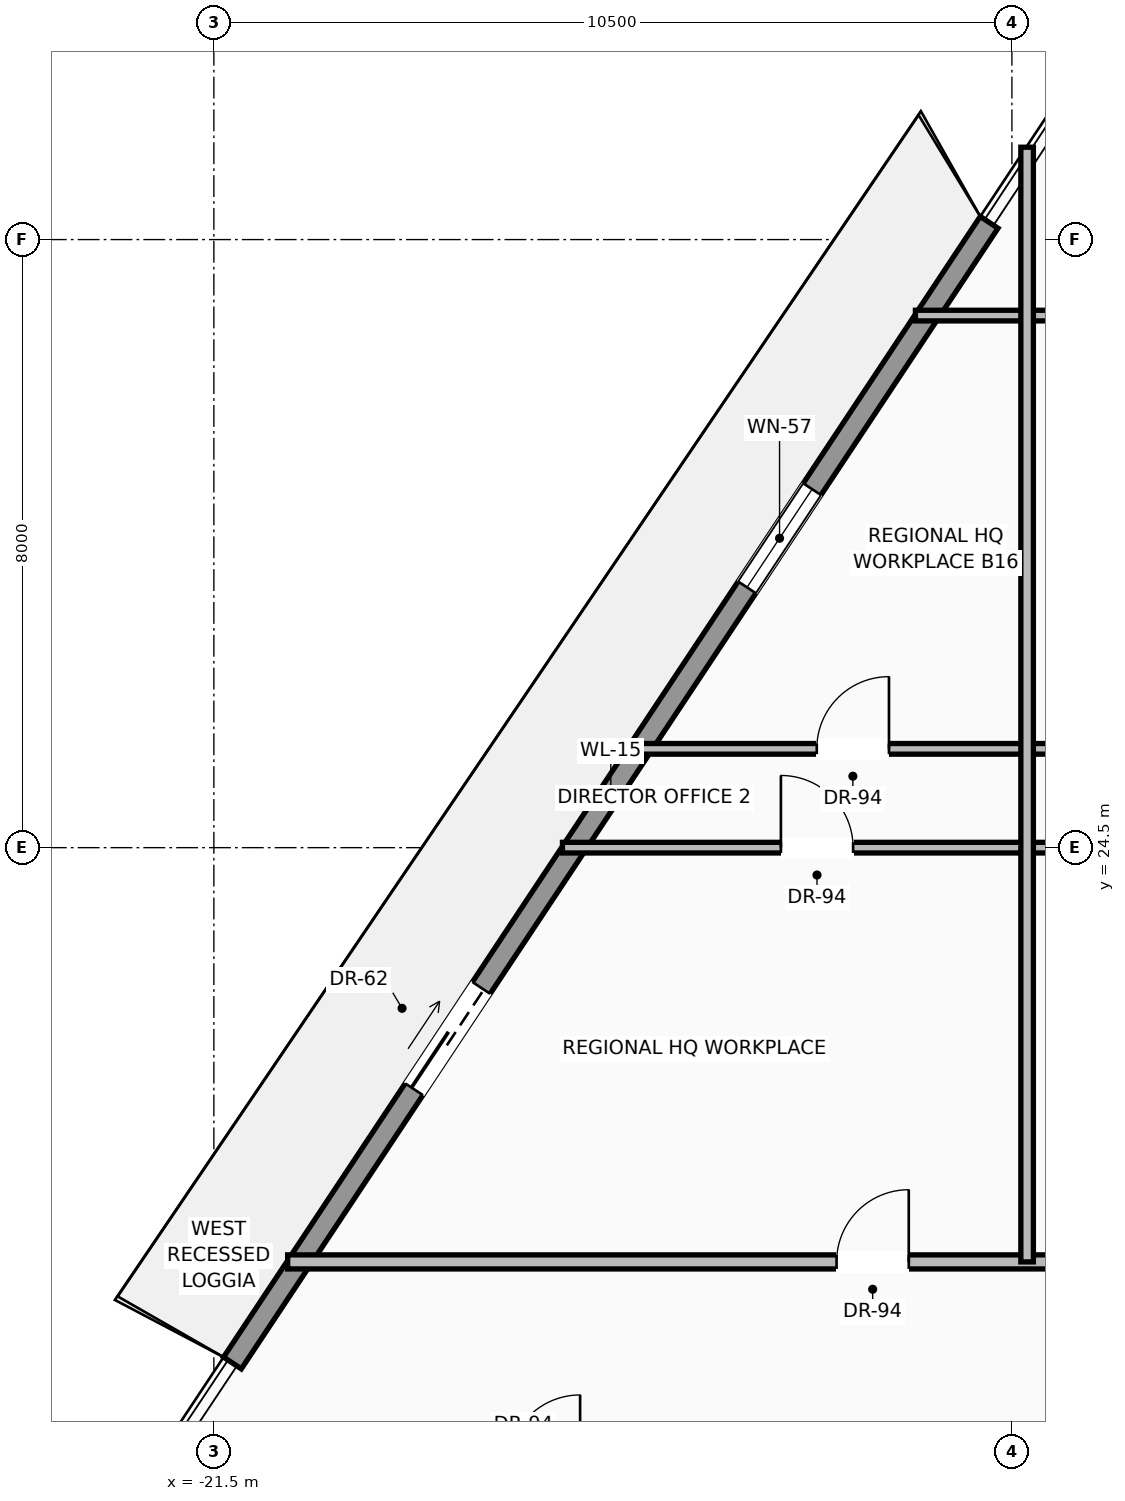
"""IFC4 building model, lengths in metres.
Left out: names, types, materials, properties, quantities, classifications, styles, units other than length and angle.
Written with IfcOpenShell. Run it as: python <this file> out.ifc"""

import sys

from ifc_helpers import new_model, si_unit, direction, frame, frame_2d, origin, place, context, subcontext, project, spatial, rectangle, extrude, source, transform, mapped, element, fill, save


model = new_model("IFC4")
c1 = context("Model", 3, precision=1e-05, world=origin(), true_north=direction((0.0, 1.0)))
c2 = subcontext(c1, "Body", "Model", "MODEL_VIEW")
j1 = project(units=[si_unit("LENGTHUNIT", "METRE"), si_unit("PLANEANGLEUNIT", "RADIAN")], contexts=[c1])
p1 = place(None, origin())
s1 = spatial("IfcSite", under=j1, at=p1, CompositionType="ELEMENT")
p2 = place(p1, origin())
s2 = spatial("IfcBuilding", under=s1, at=p2, CompositionType="ELEMENT")
p3 = place(p2, frame((0.0, 0.0, 117.3)))
s3 = spatial("IfcBuildingStorey", under=s2, at=p3, CompositionType="ELEMENT", Elevation=117.3)
p4 = place(p3, frame((-21.256, 17.72, 0.0), z_axis=(0.0, 0.0, 1.0), x_axis=(0.552837339674, 0.833289191015, 0.0)))
e1 = element("IfcWall", 1, at=p4, inside=s3, PredefinedType="SOLIDWALL", context=c2, shape_type="SweptSolid", body=[
    extrude(rectangle(XDim=18.009, YDim=0.28, at=frame_2d((9.004, 0.0))), origin(), (0.0, 0.0, 1.0), 3.0),
])
p5 = place(p4, frame((4.322, 0.0, 0.0)))
e2 = element("IfcOpeningElement", 2, at=p5, cuts=e1, PredefinedType="OPENING", context=c2, shape_type="SweptSolid", body=[
    extrude(rectangle(XDim=1.6, YDim=2.35, at=frame_2d((0.8, 1.175))), frame((0.0, 0.15, 0.0), z_axis=(0.0, -1.0, 0.0), x_axis=(1.0, 0.0, 0.0)), (0.0, 0.0, 1.0), 0.3),
])
p6 = place(p4, frame((12.246, 0.0, 0.9)))
e3 = element("IfcOpeningElement", 3, at=p6, cuts=e1, PredefinedType="OPENING", context=c2, shape_type="SweptSolid", body=[
    extrude(rectangle(XDim=1.55, YDim=1.85, at=frame_2d((0.775, 0.925))), frame((0.0, 0.15, 0.0), z_axis=(0.0, -1.0, 0.0), x_axis=(1.0, 0.0, 0.0)), (0.0, 0.0, 1.0), 0.3),
])
p7 = place(p3, frame((-20.529, 19.05, 0.0), z_axis=(0.0, 0.0, 1.0), x_axis=(1.0, 0.0, 0.0)))
e4 = element("IfcWall", 4, at=p7, inside=s3, PredefinedType="PARTITIONING", context=c2, shape_type="SweptSolid", body=[
    extrude(rectangle(XDim=17.029, YDim=0.185, at=frame_2d((8.515, 0.0))), origin(), (0.0, 0.0, 1.0), 2.717),
])
p8 = place(p7, frame((7.222, 0.0, 0.0)))
e5 = element("IfcOpeningElement", 5, at=p8, cuts=e4, PredefinedType="OPENING", context=c2, shape_type="SweptSolid", body=[
    extrude(rectangle(XDim=0.95, YDim=2.2, at=frame_2d((0.475, 1.1))), frame((0.0, 0.103, 0.0), z_axis=(0.0, -1.0, 0.0), x_axis=(1.0, 0.0, 0.0)), (0.0, 0.0, 1.0), 0.205),
])
p9 = place(p3, frame((-16.914, 24.5, 0.0), z_axis=(0.0, 0.0, 1.0), x_axis=(1.0, 0.0, 0.0)))
e6 = element("IfcWall", 6, at=p9, inside=s3, PredefinedType="PARTITIONING", context=c2, shape_type="SweptSolid", body=[
    extrude(rectangle(XDim=11.414, YDim=0.14, at=frame_2d((5.707, 0.0))), origin(), (0.0, 0.0, 1.0), 2.717),
])
p10 = place(p9, frame((2.874, 0.0, 0.0)))
e7 = element("IfcOpeningElement", 7, at=p10, cuts=e6, PredefinedType="OPENING", context=c2, shape_type="SweptSolid", body=[
    extrude(rectangle(XDim=0.95, YDim=2.2, at=frame_2d((0.475, 1.1))), frame((0.0, 0.08, 0.0), z_axis=(0.0, -1.0, 0.0), x_axis=(1.0, 0.0, 0.0)), (0.0, 0.0, 1.0), 0.16),
])
p11 = place(p9, frame((7.885, 0.0, 0.0)))
e8 = element("IfcOpeningElement", 8, at=p11, cuts=e6, PredefinedType="OPENING", context=c2, shape_type="SweptSolid", body=[
    extrude(rectangle(XDim=0.95, YDim=2.2, at=frame_2d((0.475, 1.1))), frame((0.0, 0.08, 0.0), z_axis=(0.0, -1.0, 0.0), x_axis=(1.0, 0.0, 0.0)), (0.0, 0.0, 1.0), 0.16),
])
p12 = place(p3, frame((-12.27, 31.5, 0.0), z_axis=(0.0, 0.0, 1.0), x_axis=(1.0, 0.0, 0.0)))
e9 = element("IfcWall", 9, at=p12, inside=s3, PredefinedType="PARTITIONING", context=c2, shape_type="SweptSolid", body=[
    extrude(rectangle(XDim=6.77, YDim=0.14, at=frame_2d((3.385, 0.0))), origin(), (0.0, 0.0, 1.0), 2.717),
])
p13 = place(p3, frame((-16.051, 25.8, 0.0), z_axis=(0.0, 0.0, 1.0), x_axis=(1.0, 0.0, 0.0)))
e10 = element("IfcWall", 10, at=p13, inside=s3, PredefinedType="PARTITIONING", context=c2, shape_type="SweptSolid", body=[
    extrude(rectangle(XDim=12.551, YDim=0.14, at=frame_2d((6.275, 0.0))), origin(), (0.0, 0.0, 1.0), 2.717),
])
p14 = place(p13, frame((2.483, 0.0, 0.0)))
e11 = element("IfcOpeningElement", 11, at=p14, cuts=e10, PredefinedType="OPENING", context=c2, shape_type="SweptSolid", body=[
    extrude(rectangle(XDim=0.95, YDim=2.2, at=frame_2d((0.475, 1.1))), frame((0.0, 0.08, 0.0), z_axis=(0.0, -1.0, 0.0), x_axis=(1.0, 0.0, 0.0)), (0.0, 0.0, 1.0), 0.16),
])
p15 = place(p3, frame((-10.8, 19.05, 0.0), z_axis=(0.0, 0.0, 1.0), x_axis=(0.0, 1.0, 0.0)))
e12 = element("IfcWall", 12, at=p15, inside=s3, PredefinedType="PARTITIONING", context=c2, shape_type="SweptSolid", body=[
    extrude(rectangle(XDim=14.665, YDim=0.165, at=frame_2d((7.333, 0.0))), origin(), (0.0, 0.0, 1.0), 2.717),
])
m1 = source(origin(), c2, "Body", "SweptSolid", [
    extrude(rectangle(XDim=1.6, YDim=2.35, at=frame_2d((0.8, 1.175))), frame((0.0, 0.025, 0.0), z_axis=(0.0, -1.0, 0.0), x_axis=(1.0, 0.0, 0.0)), (0.0, 0.0, 1.0), 0.05),
])
p16 = place(p5, origin())
e13 = element("IfcDoor", 13, at=p16, inside=s3, OperationType="SLIDING_TO_LEFT", PredefinedType="DOOR", context=c2, shape_type="MappedRepresentation", body=[
    mapped(m1, transform((0.0, 0.0, 0.0), scale=1.0)),
])
fill(e2, e13)
m2 = source(origin(), c2, "Body", "SweptSolid", [
    extrude(rectangle(XDim=1.55, YDim=1.85, at=frame_2d((0.775, 0.925))), frame((0.0, 0.03, 0.0), z_axis=(0.0, -1.0, 0.0), x_axis=(1.0, 0.0, 0.0)), (0.0, 0.0, 1.0), 0.06),
])
p17 = place(p6, origin())
e14 = element("IfcWindow", 14, at=p17, inside=s3, PartitioningType="SINGLE_PANEL", PredefinedType="WINDOW", context=c2, shape_type="MappedRepresentation", body=[
    mapped(m2, transform((0.0, 0.0, 0.0), scale=1.0)),
])
fill(e3, e14)
m3 = source(origin(), c2, "Body", "SweptSolid", [
    extrude(rectangle(XDim=0.95, YDim=2.2, at=frame_2d((0.475, 1.1))), frame((0.0, 0.025, 0.0), z_axis=(0.0, -1.0, 0.0), x_axis=(1.0, 0.0, 0.0)), (0.0, 0.0, 1.0), 0.05),
])
p18 = place(p8, origin())
e15 = element("IfcDoor", 15, at=p18, inside=s3, OperationType="SINGLE_SWING_RIGHT", PredefinedType="DOOR", context=c2, shape_type="MappedRepresentation", body=[
    mapped(m3, transform((0.0, 0.0, 0.0), scale=1.0)),
])
fill(e5, e15)
p19 = place(p10, origin())
e16 = element("IfcDoor", 16, at=p19, inside=s3, OperationType="SINGLE_SWING_LEFT", PredefinedType="DOOR", context=c2, shape_type="MappedRepresentation", body=[
    mapped(m3, transform((0.0, 0.0, 0.0), scale=1.0)),
])
fill(e7, e16)
p20 = place(p14, origin())
e17 = element("IfcDoor", 17, at=p20, inside=s3, OperationType="SINGLE_SWING_RIGHT", PredefinedType="DOOR", context=c2, shape_type="MappedRepresentation", body=[
    mapped(m3, transform((0.0, 0.0, 0.0), scale=1.0)),
])
fill(e11, e17)
save(model, sys.argv[1])
